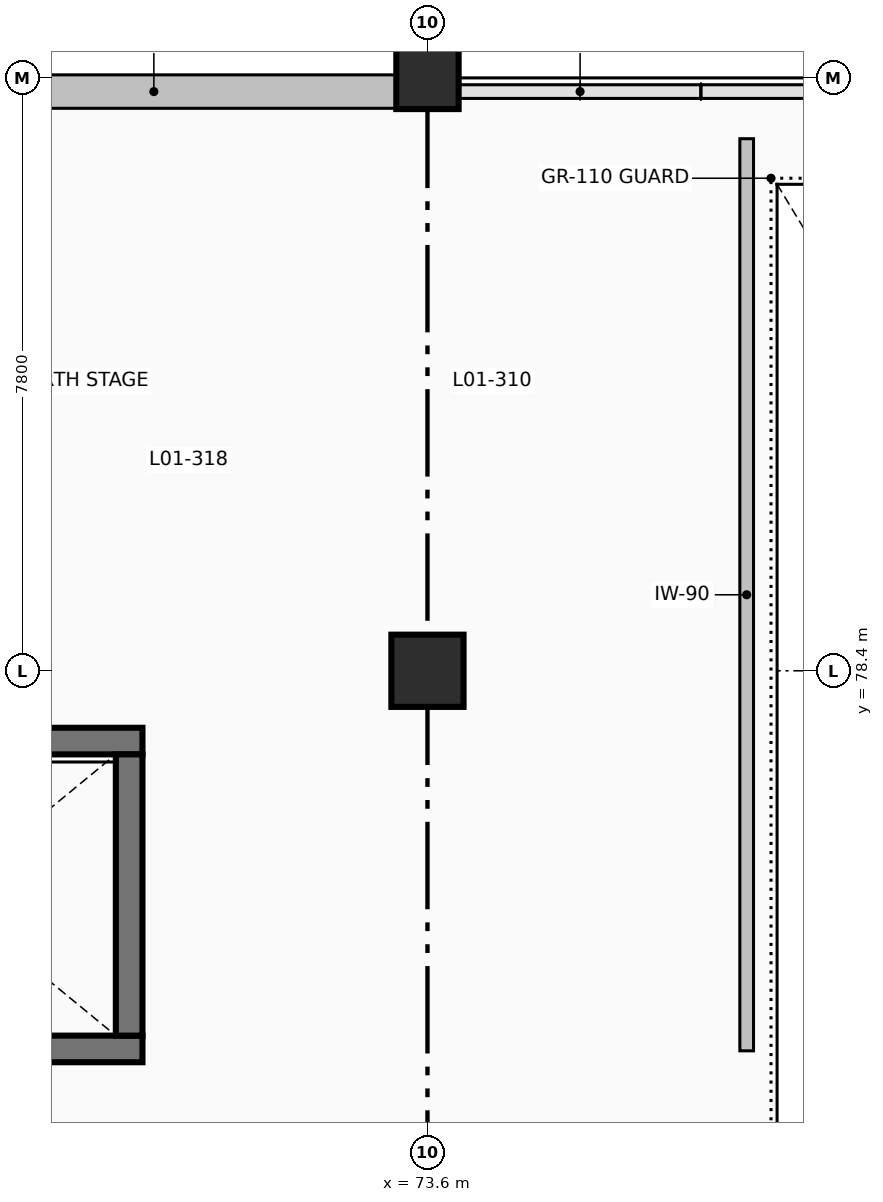
"""IFC4 building model, lengths in metres.
Left out: names, types, materials, properties, quantities, classifications, styles, units other than length and angle.
Written with IfcOpenShell. Run it as: python <this file> out.ifc"""

import sys

from ifc_helpers import new_model, si_unit, direction, frame, frame_2d, origin, origin_2d, place, context, subcontext, project, spatial, rectangle, extrude, element, save


model = new_model("IFC4")
c1 = context("Model", 3, precision=1e-05, world=origin(), true_north=direction((0.0, 1.0)))
c2 = subcontext(c1, "Body", "Model", "MODEL_VIEW")
j1 = project(units=[si_unit("LENGTHUNIT", "METRE"), si_unit("PLANEANGLEUNIT", "RADIAN")], contexts=[c1])
p1 = place(None, origin())
s1 = spatial("IfcSite", under=j1, at=p1, CompositionType="ELEMENT")
p2 = place(p1, origin())
s2 = spatial("IfcBuilding", under=s1, at=p2, CompositionType="ELEMENT")
p3 = place(p2, frame((0.0, 0.0, 5.4)))
s3 = spatial("IfcBuildingStorey", under=s2, at=p3, CompositionType="ELEMENT", Elevation=5.4)
p4 = place(p3, frame((73.6, 78.4, 0.0), z_axis=(0.0, 0.0, 1.0), x_axis=(1.0, 0.0, 0.0)))
e1 = element("IfcColumn", 1, at=p4, inside=s3, PredefinedType="COLUMN", context=c2, shape_type="SweptSolid", body=[
    extrude(rectangle(XDim=0.95, YDim=0.95, at=origin_2d()), origin(), (0.0, 0.0, 1.0), 4.8),
])
p5 = place(p3, frame((73.6, 86.2, 0.0), z_axis=(0.0, 0.0, 1.0), x_axis=(1.0, 0.0, 0.0)))
e2 = element("IfcColumn", 2, at=p5, inside=s3, PredefinedType="COLUMN", context=c2, shape_type="SweptSolid", body=[
    extrude(rectangle(XDim=0.82, YDim=0.82, at=origin_2d()), origin(), (0.0, 0.0, 1.0), 4.8),
])
for number, where, z_axis, x_axis in (
    (3, (61.45, 73.425, 0.0), (0.0, 0.0, 1.0), (1.0, 0.0, 0.0)),
    (4, (69.85, 77.475, 0.0), (0.0, 0.0, 1.0), (-1.0, 0.0, 0.0)),
):
    element("IfcWall", number, at=place(p3, frame(where, z_axis=z_axis, x_axis=x_axis)), inside=s3, PredefinedType="SHEAR", context=c2, shape_type="SweptSolid", body=[
        extrude(rectangle(XDim=8.4, YDim=0.35, at=frame_2d((4.2, 0.0))), origin(), (0.0, 0.0, 1.0), 4.48),
    ])
p6 = place(p3, frame((69.675, 77.3, 0.0), z_axis=(0.0, 0.0, 1.0), x_axis=(0.0, -1.0, 0.0)))
e5 = element("IfcWall", 5, at=p6, inside=s3, PredefinedType="SHEAR", context=c2, shape_type="SweptSolid", body=[
    extrude(rectangle(XDim=3.7, YDim=0.35, at=frame_2d((1.85, 0.0))), origin(), (0.0, 0.0, 1.0), 4.48),
])
p7 = place(p3, frame((66.81, 86.02, 0.0), z_axis=(0.0, 0.0, 1.0), x_axis=(1.0, 0.0, 0.0)))
e6 = element("IfcWall", 6, at=p7, inside=s3, PredefinedType="SOLIDWALL", context=c2, shape_type="SweptSolid", body=[
    extrude(rectangle(XDim=6.38, YDim=0.44, at=frame_2d((3.19, 0.0))), origin(), (0.0, 0.0, 1.0), 3.722),
])
p8 = place(p3, frame((77.8, 73.4, 0.0), z_axis=(0.0, 0.0, 1.0), x_axis=(0.0, 1.0, 0.0)))
e7 = element("IfcWall", 7, at=p8, inside=s3, PredefinedType="PARTITIONING", context=c2, shape_type="SweptSolid", body=[
    extrude(rectangle(XDim=12.0, YDim=0.18, at=frame_2d((6.0, 0.0))), origin(), (0.0, 0.0, 1.0), 4.472),
])
save(model, sys.argv[1])
